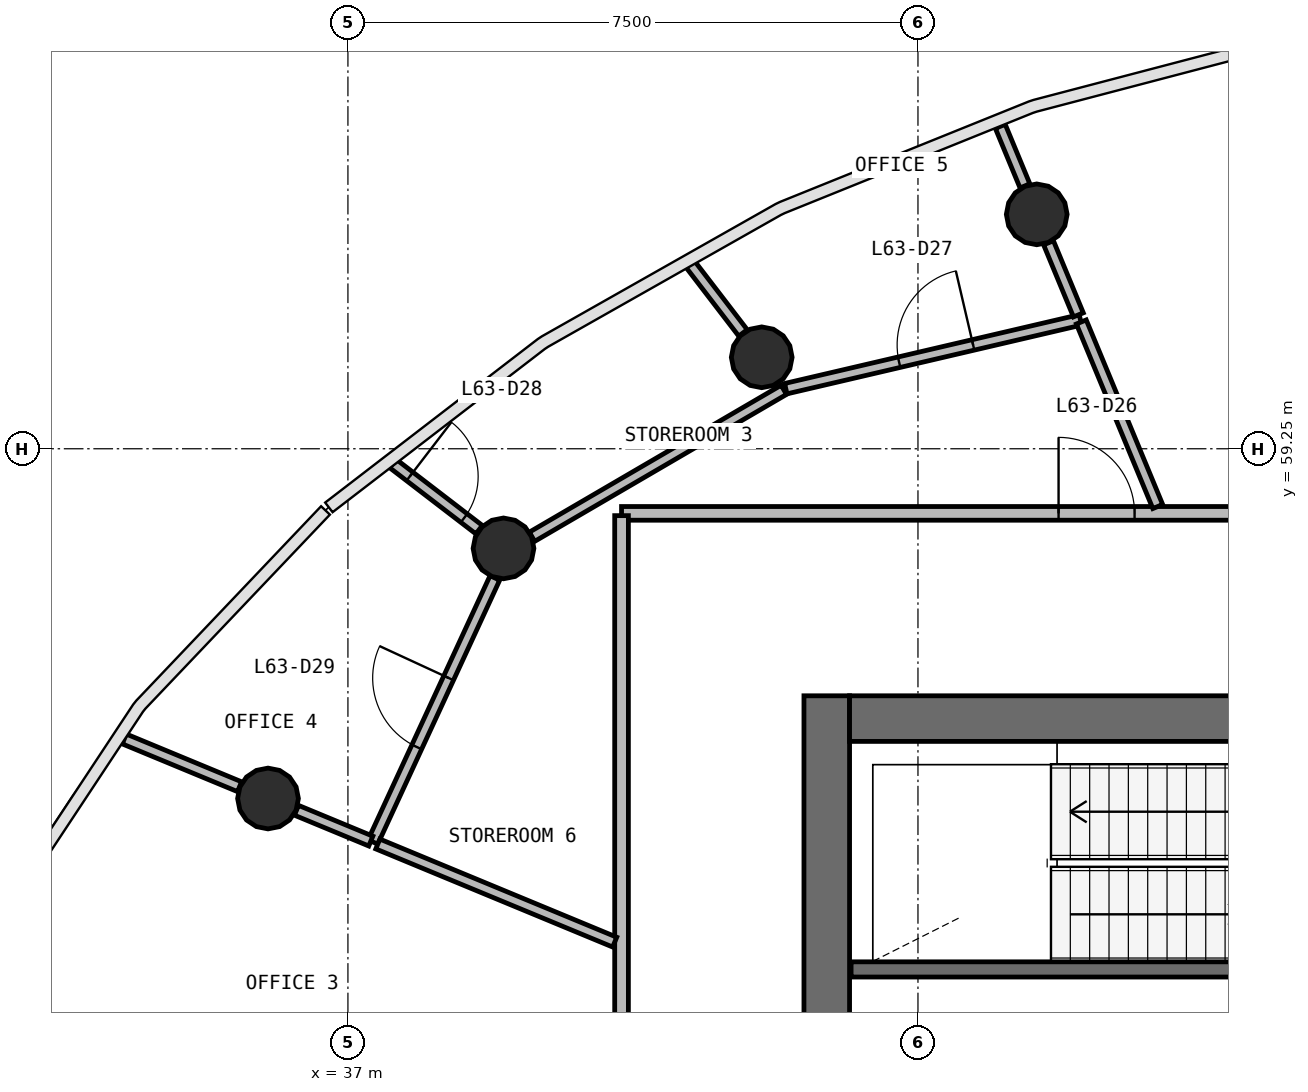
"""IFC4 building model, lengths in metres.
Left out: names, types, materials, properties, quantities, classifications, styles, units other than length and angle.
Written with IfcOpenShell. Run it as: python <this file> out.ifc"""

import sys

from ifc_helpers import new_model, si_unit, direction, frame, frame_2d, origin, origin_2d, place, context, subcontext, project, spatial, rectangle, circle, extrude, source, transform, mapped, element, fill, save


model = new_model("IFC4")
c1 = context("Model", 3, precision=1e-05, world=origin(), true_north=direction((0.0, 1.0)))
c2 = subcontext(c1, "Body", "Model", "MODEL_VIEW")
j1 = project(units=[si_unit("LENGTHUNIT", "METRE"), si_unit("PLANEANGLEUNIT", "RADIAN")], contexts=[c1])
p1 = place(None, origin())
s1 = spatial("IfcSite", under=j1, at=p1, CompositionType="ELEMENT")
p2 = place(p1, origin())
s2 = spatial("IfcBuilding", under=s1, at=p2, CompositionType="ELEMENT")
p3 = place(p2, frame((0.0, 0.0, 257.9)))
s3 = spatial("IfcBuildingStorey", under=s2, at=p3, CompositionType="ELEMENT", Elevation=257.9)
p4 = place(p3, frame((43.3, 56.0, 0.0), z_axis=(0.0, 0.0, 1.0), x_axis=(0.0, -1.0, 0.0)))
e1 = element("IfcWall", 1, at=p4, inside=s3, PredefinedType="SHEAR", context=c2, shape_type="SweptSolid", body=[
    extrude(rectangle(XDim=16.0, YDim=0.6, at=frame_2d((8.0, 0.0))), origin(), (0.0, 0.0, 1.0), 3.9),
])
p5 = place(p4, frame((7.1, 0.0, 0.0)))
e2 = element("IfcOpeningElement", 2, at=p5, cuts=e1, PredefinedType="OPENING", context=c2, shape_type="SweptSolid", body=[
    extrude(rectangle(XDim=1.8, YDim=2.1, at=frame_2d((0.9, 1.05))), frame((0.0, 0.31, 0.0), z_axis=(0.0, -1.0, 0.0), x_axis=(1.0, 0.0, 0.0)), (0.0, 0.0, 1.0), 0.62),
])
p6 = place(p3, frame((60.4, 55.7, 0.0), z_axis=(0.0, 0.0, 1.0), x_axis=(-1.0, 0.0, 0.0)))
e3 = element("IfcWall", 3, at=p6, inside=s3, PredefinedType="SHEAR", context=c2, shape_type="SweptSolid", body=[
    extrude(rectangle(XDim=16.8, YDim=0.6, at=frame_2d((8.4, 0.0))), origin(), (0.0, 0.0, 1.0), 3.9),
])
p7 = place(p6, frame((0.4, 0.0, 0.0)))
e4 = element("IfcOpeningElement", 4, at=p7, cuts=e3, PredefinedType="OPENING", context=c2, shape_type="SweptSolid", body=[
    extrude(rectangle(XDim=1.1, YDim=2.1, at=frame_2d((0.55, 1.05))), frame((0.0, 0.31, 0.0), z_axis=(0.0, -1.0, 0.0), x_axis=(1.0, 0.0, 0.0)), (0.0, 0.0, 1.0), 0.62),
])
p8 = place(p6, frame((10.3, 0.0, 0.0)))
e5 = element("IfcOpeningElement", 5, at=p8, cuts=e3, PredefinedType="OPENING", context=c2, shape_type="SweptSolid", body=[
    extrude(rectangle(XDim=1.2, YDim=2.1, at=frame_2d((0.6, 1.05))), frame((0.0, 0.31, 0.0), z_axis=(0.0, -1.0, 0.0), x_axis=(1.0, 0.0, 0.0)), (0.0, 0.0, 1.0), 0.62),
])
p9 = place(p6, frame((7.25, 0.0, 0.0)))
e6 = element("IfcOpeningElement", 6, at=p9, cuts=e3, PredefinedType="OPENING", context=c2, shape_type="SweptSolid", body=[
    extrude(rectangle(XDim=1.1, YDim=2.1, at=frame_2d((0.55, 1.05))), frame((0.0, 0.31, 0.0), z_axis=(0.0, -1.0, 0.0), x_axis=(1.0, 0.0, 0.0)), (0.0, 0.0, 1.0), 0.62),
])
m1 = source(origin(), c2, "Body", "SweptSolid", [
    extrude(circle(Radius=0.4, at=origin_2d()), origin(), (0.0, 0.0, 1.0), 3.9),
])
for number, where, z_axis, x_axis in (
    (7, (46.063, 62.334, 0.0), (0.0, 0.0, 1.0), (1.0, 0.0, 0.0)),
    (8, (42.444, 60.453, 0.0), (0.0, 0.0, 1.0), (1.0, 0.0, 0.0)),
    (9, (39.047, 57.939, 0.0), (0.0, 0.0, 1.0), (1.0, 0.0, 0.0)),
    (10, (35.948, 54.649, 0.0), (0.0, 0.0, 1.0), (1.0, 0.0, 0.0)),
):
    element("IfcColumn", number, at=place(p3, frame(where, z_axis=z_axis, x_axis=x_axis)), inside=s3, PredefinedType="COLUMN", context=c2, shape_type="MappedRepresentation", body=[
        mapped(m1, transform((0.0, 0.0, 0.0), scale=1.0)),
    ])
p10 = place(p3, frame((43.62, 52.4, 0.0), z_axis=(0.0, 0.0, 1.0), x_axis=(1.0, 0.0, 0.0)))
e11 = element("IfcWall", 11, at=p10, inside=s3, PredefinedType="SOLIDWALL", context=c2, shape_type="SweptSolid", body=[
    extrude(rectangle(XDim=6.78, YDim=0.2, at=frame_2d((3.39, 0.0))), origin(), (0.0, 0.0, 1.0), 3.58),
])
p11 = place(p3, frame((40.6, 58.4, 0.0), z_axis=(0.0, 0.0, 1.0), x_axis=(1.0, 0.0, 0.0)))
e12 = element("IfcWall", 12, at=p11, inside=s3, PredefinedType="PARTITIONING", context=c2, shape_type="SweptSolid", body=[
    extrude(rectangle(XDim=22.8, YDim=0.18, at=frame_2d((11.4, 0.0))), origin(), (0.0, 0.0, 1.0), 2.88),
])
p12 = place(p11, frame((10.95, 0.0, 0.0)))
e13 = element("IfcOpeningElement", 13, at=p12, cuts=e12, PredefinedType="OPENING", context=c2, shape_type="SweptSolid", body=[
    extrude(rectangle(XDim=1.0, YDim=2.1, at=frame_2d((0.5, 1.05))), frame((0.0, 0.1, 0.0), z_axis=(0.0, -1.0, 0.0), x_axis=(1.0, 0.0, 0.0)), (0.0, 0.0, 1.0), 0.2),
])
p13 = place(p11, frame((5.75, 0.0, 0.0)))
e14 = element("IfcOpeningElement", 14, at=p13, cuts=e12, PredefinedType="OPENING", context=c2, shape_type="SweptSolid", body=[
    extrude(rectangle(XDim=1.0, YDim=2.1, at=frame_2d((0.5, 1.05))), frame((0.0, 0.1, 0.0), z_axis=(0.0, -1.0, 0.0), x_axis=(1.0, 0.0, 0.0)), (0.0, 0.0, 1.0), 0.2),
])
p14 = place(p3, frame((40.6, 37.63, 0.0), z_axis=(0.0, 0.0, 1.0), x_axis=(0.0, 1.0, 0.0)))
e15 = element("IfcWall", 15, at=p14, inside=s3, PredefinedType="PARTITIONING", context=c2, shape_type="SweptSolid", body=[
    extrude(rectangle(XDim=20.74, YDim=0.18, at=frame_2d((10.37, 0.0))), origin(), (0.0, 0.0, 1.0), 2.88),
])
p15 = place(p14, frame((12.09, 0.0, 0.0)))
e16 = element("IfcOpeningElement", 16, at=p15, cuts=e15, PredefinedType="OPENING", context=c2, shape_type="SweptSolid", body=[
    extrude(rectangle(XDim=1.0, YDim=2.1, at=frame_2d((0.5, 1.05))), frame((0.0, 0.1, 0.0), z_axis=(0.0, -1.0, 0.0), x_axis=(1.0, 0.0, 0.0)), (0.0, 0.0, 1.0), 0.2),
])
p16 = place(p14, frame((9.89, 0.0, 0.0)))
e17 = element("IfcOpeningElement", 17, at=p16, cuts=e15, PredefinedType="OPENING", context=c2, shape_type="SweptSolid", body=[
    extrude(rectangle(XDim=1.0, YDim=2.1, at=frame_2d((0.5, 1.05))), frame((0.0, 0.1, 0.0), z_axis=(0.0, -1.0, 0.0), x_axis=(1.0, 0.0, 0.0)), (0.0, 0.0, 1.0), 0.2),
])
p17 = place(p3, frame((42.761, 60.04, 0.0), z_axis=(0.0, 0.0, 1.0), x_axis=(0.973788258545, 0.227456429935, 0.0)))
e18 = element("IfcWall", 18, at=p17, inside=s3, PredefinedType="PARTITIONING", context=c2, shape_type="SweptSolid", body=[
    extrude(rectangle(XDim=3.981, YDim=0.14, at=frame_2d((1.99, 0.0))), origin(), (0.0, 0.0, 1.0), 2.88),
])
p18 = place(p17, frame((1.531, 0.0, 0.0)))
e19 = element("IfcOpeningElement", 19, at=p18, cuts=e18, PredefinedType="OPENING", context=c2, shape_type="SweptSolid", body=[
    extrude(rectangle(XDim=1.0, YDim=2.1, at=frame_2d((0.5, 1.05))), frame((0.0, 0.08, 0.0), z_axis=(0.0, -1.0, 0.0), x_axis=(1.0, 0.0, 0.0)), (0.0, 0.0, 1.0), 0.16),
])
p19 = place(p3, frame((42.735, 60.025, 0.0), z_axis=(0.0, 0.0, 1.0), x_axis=(-0.863735038192, -0.503946211216, 0.0)))
e20 = element("IfcWall", 20, at=p19, inside=s3, PredefinedType="PARTITIONING", context=c2, shape_type="SweptSolid", body=[
    extrude(rectangle(XDim=3.836, YDim=0.14, at=frame_2d((1.918, 0.0))), origin(), (0.0, 0.0, 1.0), 2.88),
])
p20 = place(p3, frame((37.329, 54.077, 0.0), z_axis=(0.0, 0.0, 1.0), x_axis=(0.41938588657, 0.907808062393, 0.0)))
e21 = element("IfcWall", 21, at=p20, inside=s3, PredefinedType="PARTITIONING", context=c2, shape_type="SweptSolid", body=[
    extrude(rectangle(XDim=3.826, YDim=0.14, at=frame_2d((1.913, 0.0))), origin(), (0.0, 0.0, 1.0), 2.88),
])
p21 = place(p20, frame((1.376, 0.0, 0.0)))
e22 = element("IfcOpeningElement", 22, at=p21, cuts=e21, PredefinedType="OPENING", context=c2, shape_type="SweptSolid", body=[
    extrude(rectangle(XDim=1.0, YDim=2.1, at=frame_2d((0.5, 1.05))), frame((0.0, 0.08, 0.0), z_axis=(0.0, -1.0, 0.0), x_axis=(1.0, 0.0, 0.0)), (0.0, 0.0, 1.0), 0.16),
])
p22 = place(p3, frame((40.51, 52.759, 0.0), z_axis=(0.0, 0.0, 1.0), x_axis=(-0.923865103175, 0.382718266008, 0.0)))
e23 = element("IfcWall", 23, at=p22, inside=s3, PredefinedType="PARTITIONING", context=c2, shape_type="SweptSolid", body=[
    extrude(rectangle(XDim=3.373, YDim=0.14, at=frame_2d((1.687, 0.0))), origin(), (0.0, 0.0, 1.0), 2.88),
])
p23 = place(p3, frame((47.655, 58.49, 0.0), z_axis=(0.0, 0.0, 1.0), x_axis=(-0.382622530828, 0.923904756402, 0.0)))
e24 = element("IfcWall", 24, at=p23, inside=s3, PredefinedType="PARTITIONING", context=c2, shape_type="SweptSolid", body=[
    extrude(rectangle(XDim=2.628, YDim=0.14, at=frame_2d((1.314, 0.0))), origin(), (0.0, 0.0, 1.0), 2.88),
])
p24 = place(p3, frame((35.574, 54.804, 0.0), z_axis=(0.0, 0.0, 1.0), x_axis=(-0.923884509339, 0.38267141702, 0.0)))
e25 = element("IfcWall", 25, at=p24, inside=s3, PredefinedType="PARTITIONING", context=c2, shape_type="SweptSolid", body=[
    extrude(rectangle(XDim=1.642, YDim=0.14, at=frame_2d((0.821, 0.0))), origin(), (0.0, 0.0, 1.0), 2.88),
])
p25 = place(p3, frame((37.591, 59.056, 0.0), z_axis=(0.0, 0.0, 1.0), x_axis=(0.793378326769, -0.608728864613, 0.0)))
e26 = element("IfcWall", 26, at=p25, inside=s3, PredefinedType="PARTITIONING", context=c2, shape_type="SweptSolid", body=[
    extrude(rectangle(XDim=1.431, YDim=0.14, at=frame_2d((0.715, 0.0))), origin(), (0.0, 0.0, 1.0), 2.88),
])
p26 = place(p25, frame((0.281, 0.0, 0.0)))
e27 = element("IfcOpeningElement", 27, at=p26, cuts=e26, PredefinedType="OPENING", context=c2, shape_type="SweptSolid", body=[
    extrude(rectangle(XDim=0.9, YDim=2.1, at=frame_2d((0.45, 1.05))), frame((0.0, 0.08, 0.0), z_axis=(0.0, -1.0, 0.0), x_axis=(1.0, 0.0, 0.0)), (0.0, 0.0, 1.0), 0.16),
])
p27 = place(p3, frame((42.198, 60.774, 0.0), z_axis=(0.0, 0.0, 1.0), x_axis=(-0.608781268648, 0.793338116406, 0.0)))
e28 = element("IfcWall", 28, at=p27, inside=s3, PredefinedType="PARTITIONING", context=c2, shape_type="SweptSolid", body=[
    extrude(rectangle(XDim=1.143, YDim=0.14, at=frame_2d((0.571, 0.0))), origin(), (0.0, 0.0, 1.0), 2.88),
])
p28 = place(p3, frame((46.611, 61.011, 0.0), z_axis=(0.0, 0.0, 1.0), x_axis=(-0.382722926072, 0.923863172693, 0.0)))
e29 = element("IfcWall", 29, at=p28, inside=s3, PredefinedType="PARTITIONING", context=c2, shape_type="SweptSolid", body=[
    extrude(rectangle(XDim=1.026, YDim=0.14, at=frame_2d((0.513, 0.0))), origin(), (0.0, 0.0, 1.0), 2.88),
])
p29 = place(p3, frame((37.301, 54.088, 0.0), z_axis=(0.0, 0.0, 1.0), x_axis=(-0.923777919461, 0.382928655908, 0.0)))
e30 = element("IfcWall", 30, at=p29, inside=s3, PredefinedType="PARTITIONING", context=c2, shape_type="SweptSolid", body=[
    extrude(rectangle(XDim=1.059, YDim=0.14, at=frame_2d((0.53, 0.0))), origin(), (0.0, 0.0, 1.0), 2.88),
])
p30 = place(p3, frame((45.908, 62.708, 0.0), z_axis=(0.0, 0.0, 1.0), x_axis=(-0.382877217127, 0.923799240422, 0.0)))
e31 = element("IfcWall", 31, at=p30, inside=s3, PredefinedType="PARTITIONING", context=c2, shape_type="SweptSolid", body=[
    extrude(rectangle(XDim=0.848, YDim=0.14, at=frame_2d((0.424, 0.0))), origin(), (0.0, 0.0, 1.0), 2.88),
])
m2 = source(origin(), c2, "Body", "SweptSolid", [
    extrude(rectangle(XDim=1.0, YDim=2.1, at=frame_2d((0.5, 1.05))), frame((0.0, 0.025, 0.0), z_axis=(0.0, -1.0, 0.0), x_axis=(1.0, 0.0, 0.0)), (0.0, 0.0, 1.0), 0.05),
])
p31 = place(p13, origin())
e32 = element("IfcDoor", 32, at=p31, inside=s3, OperationType="SINGLE_SWING_LEFT", PredefinedType="DOOR", context=c2, shape_type="MappedRepresentation", body=[
    mapped(m2, transform((0.0, 0.0, 0.0), scale=1.0)),
])
fill(e14, e32)
p32 = place(p18, origin())
e33 = element("IfcDoor", 33, at=p32, inside=s3, OperationType="SINGLE_SWING_RIGHT", PredefinedType="DOOR", context=c2, shape_type="MappedRepresentation", body=[
    mapped(m2, transform((0.0, 0.0, 0.0), scale=1.0)),
])
fill(e19, e33)
m3 = source(origin(), c2, "Body", "SweptSolid", [
    extrude(rectangle(XDim=0.9, YDim=2.1, at=frame_2d((0.45, 1.05))), frame((0.0, 0.025, 0.0), z_axis=(0.0, -1.0, 0.0), x_axis=(1.0, 0.0, 0.0)), (0.0, 0.0, 1.0), 0.05),
])
p33 = place(p26, origin())
e34 = element("IfcDoor", 34, at=p33, inside=s3, OperationType="SINGLE_SWING_LEFT", PredefinedType="DOOR", context=c2, shape_type="MappedRepresentation", body=[
    mapped(m3, transform((0.0, 0.0, 0.0), scale=1.0)),
])
fill(e27, e34)
p34 = place(p21, origin())
e35 = element("IfcDoor", 35, at=p34, inside=s3, OperationType="SINGLE_SWING_RIGHT", PredefinedType="DOOR", context=c2, shape_type="MappedRepresentation", body=[
    mapped(m2, transform((0.0, 0.0, 0.0), scale=1.0)),
])
fill(e22, e35)
save(model, sys.argv[1])
